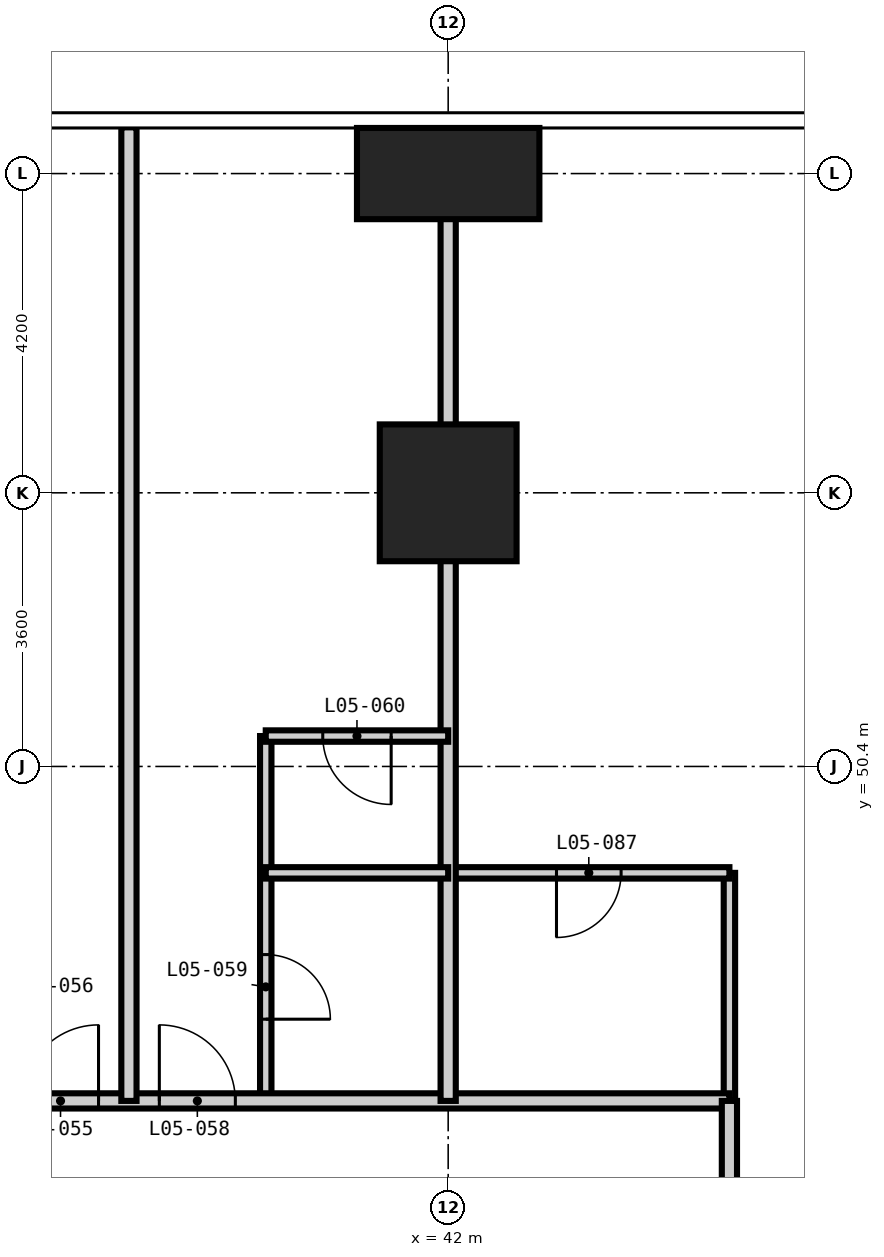
"""IFC4 building model, lengths in metres.
Left out: names, types, materials, properties, quantities, classifications, styles, units other than length and angle.
Written with IfcOpenShell. Run it as: python <this file> out.ifc"""

import sys

from ifc_helpers import new_model, si_unit, direction, frame, frame_2d, origin, origin_2d, place, context, subcontext, project, spatial, rectangle, extrude, element, fill, save


model = new_model("IFC4")
c1 = context("Model", 3, precision=1e-05, world=origin(), true_north=direction((0.0, 1.0)))
c2 = subcontext(c1, "Body", "Model", "MODEL_VIEW")
j1 = project(units=[si_unit("LENGTHUNIT", "METRE"), si_unit("PLANEANGLEUNIT", "RADIAN")], contexts=[c1])
p1 = place(None, origin())
s1 = spatial("IfcSite", under=j1, at=p1, CompositionType="ELEMENT")
p2 = place(p1, origin())
s2 = spatial("IfcBuilding", under=s1, at=p2, CompositionType="ELEMENT")
p3 = place(p2, frame((0.0, 0.0, 27.0)))
s3 = spatial("IfcBuildingStorey", under=s2, at=p3, CompositionType="ELEMENT", Elevation=27.0)
p4 = place(p3, frame((42.0, 54.0, -0.35), z_axis=(0.0, 0.0, 1.0), x_axis=(1.0, 0.0, 0.0)))
e1 = element("IfcColumn", 1, at=p4, inside=s3, PredefinedType="COLUMN", context=c2, shape_type="SweptSolid", body=[
    extrude(rectangle(XDim=1.8, YDim=1.8, at=origin_2d()), origin(), (0.0, 0.0, 1.0), 3.6),
])
p5 = place(p3, frame((42.0, 58.2, -0.35), z_axis=(0.0, 0.0, 1.0), x_axis=(1.0, 0.0, 0.0)))
e2 = element("IfcColumn", 2, at=p5, inside=s3, PredefinedType="COLUMN", context=c2, shape_type="SweptSolid", body=[
    extrude(rectangle(XDim=2.4, YDim=1.2, at=origin_2d()), origin(), (0.0, 0.0, 1.0), 3.6),
])
p6 = place(p3, frame((39.6, 46.0, 0.0), z_axis=(0.0, 0.0, 1.0), x_axis=(0.0, 1.0, 0.0)))
e3 = element("IfcWall", 3, at=p6, inside=s3, PredefinedType="PARTITIONING", context=c2, shape_type="SweptSolid", body=[
    extrude(rectangle(XDim=3.0, YDim=0.15, at=frame_2d((1.5, 0.0))), origin(), (0.0, 0.0, 1.0), 3.25),
])
p7 = place(p6, frame((1.075, 0.0, 0.0)))
e4 = element("IfcOpeningElement", 4, at=p7, cuts=e3, PredefinedType="OPENING", context=c2, shape_type="SweptSolid", body=[
    extrude(rectangle(XDim=0.85, YDim=2.1, at=frame_2d((0.425, 1.05))), frame((0.0, 0.085, 0.0), z_axis=(0.0, -1.0, 0.0), x_axis=(1.0, 0.0, 0.0)), (0.0, 0.0, 1.0), 0.17),
])
p8 = place(p3, frame((45.7, 46.0, 0.0), z_axis=(0.0, 0.0, 1.0), x_axis=(0.0, 1.0, 0.0)))
e5 = element("IfcWall", 5, at=p8, inside=s3, PredefinedType="PARTITIONING", context=c2, shape_type="SweptSolid", body=[
    extrude(rectangle(XDim=3.0, YDim=0.15, at=frame_2d((1.5, 0.0))), origin(), (0.0, 0.0, 1.0), 3.25),
])
p9 = place(p3, frame((42.0, 49.0, 0.0), z_axis=(0.0, 0.0, 1.0), x_axis=(1.0, 0.0, 0.0)))
e6 = element("IfcWall", 6, at=p9, inside=s3, PredefinedType="PARTITIONING", context=c2, shape_type="SweptSolid", body=[
    extrude(rectangle(XDim=3.7, YDim=0.15, at=frame_2d((1.85, 0.0))), origin(), (0.0, 0.0, 1.0), 3.25),
])
p10 = place(p9, frame((1.425, 0.0, 0.0)))
e7 = element("IfcOpeningElement", 7, at=p10, cuts=e6, PredefinedType="OPENING", context=c2, shape_type="SweptSolid", body=[
    extrude(rectangle(XDim=0.85, YDim=2.1, at=frame_2d((0.425, 1.05))), frame((0.0, 0.085, 0.0), z_axis=(0.0, -1.0, 0.0), x_axis=(1.0, 0.0, 0.0)), (0.0, 0.0, 1.0), 0.17),
])
p11 = place(p3, frame((13.4, 46.0, 0.0), z_axis=(0.0, 0.0, 1.0), x_axis=(1.0, 0.0, 0.0)))
e8 = element("IfcWall", 8, at=p11, inside=s3, PredefinedType="PARTITIONING", context=c2, shape_type="SweptSolid", body=[
    extrude(rectangle(XDim=32.3, YDim=0.2, at=frame_2d((16.15, 0.0))), origin(), (0.0, 0.0, 1.0), 3.25),
])
p12 = place(p11, frame((6.2, 0.0, 0.0)))
e9 = element("IfcOpeningElement", 9, at=p12, cuts=e8, PredefinedType="OPENING", context=c2, shape_type="SweptSolid", body=[
    extrude(rectangle(XDim=1.0, YDim=2.2, at=frame_2d((0.5, 1.1))), frame((0.0, 0.11, 0.0), z_axis=(0.0, -1.0, 0.0), x_axis=(1.0, 0.0, 0.0)), (0.0, 0.0, 1.0), 0.22),
])
p13 = place(p11, frame((8.0, 0.0, 0.0)))
e10 = element("IfcOpeningElement", 10, at=p13, cuts=e8, PredefinedType="OPENING", context=c2, shape_type="SweptSolid", body=[
    extrude(rectangle(XDim=1.0, YDim=2.2, at=frame_2d((0.5, 1.1))), frame((0.0, 0.11, 0.0), z_axis=(0.0, -1.0, 0.0), x_axis=(1.0, 0.0, 0.0)), (0.0, 0.0, 1.0), 0.22),
])
p14 = place(p11, frame((14.6, 0.0, 0.0)))
e11 = element("IfcOpeningElement", 11, at=p14, cuts=e8, PredefinedType="OPENING", context=c2, shape_type="SweptSolid", body=[
    extrude(rectangle(XDim=1.0, YDim=2.2, at=frame_2d((0.5, 1.1))), frame((0.0, 0.11, 0.0), z_axis=(0.0, -1.0, 0.0), x_axis=(1.0, 0.0, 0.0)), (0.0, 0.0, 1.0), 0.22),
])
p15 = place(p11, frame((16.4, 0.0, 0.0)))
e12 = element("IfcOpeningElement", 12, at=p15, cuts=e8, PredefinedType="OPENING", context=c2, shape_type="SweptSolid", body=[
    extrude(rectangle(XDim=1.0, YDim=2.2, at=frame_2d((0.5, 1.1))), frame((0.0, 0.11, 0.0), z_axis=(0.0, -1.0, 0.0), x_axis=(1.0, 0.0, 0.0)), (0.0, 0.0, 1.0), 0.22),
])
p16 = place(p11, frame((23.0, 0.0, 0.0)))
e13 = element("IfcOpeningElement", 13, at=p16, cuts=e8, PredefinedType="OPENING", context=c2, shape_type="SweptSolid", body=[
    extrude(rectangle(XDim=1.0, YDim=2.2, at=frame_2d((0.5, 1.1))), frame((0.0, 0.11, 0.0), z_axis=(0.0, -1.0, 0.0), x_axis=(1.0, 0.0, 0.0)), (0.0, 0.0, 1.0), 0.22),
])
p17 = place(p11, frame((24.8, 0.0, 0.0)))
e14 = element("IfcOpeningElement", 14, at=p17, cuts=e8, PredefinedType="OPENING", context=c2, shape_type="SweptSolid", body=[
    extrude(rectangle(XDim=1.0, YDim=2.2, at=frame_2d((0.5, 1.1))), frame((0.0, 0.11, 0.0), z_axis=(0.0, -1.0, 0.0), x_axis=(1.0, 0.0, 0.0)), (0.0, 0.0, 1.0), 0.22),
])
p18 = place(p3, frame((45.7, 46.0, 0.0), z_axis=(0.0, 0.0, 1.0), x_axis=(0.0, -1.0, 0.0)))
e15 = element("IfcWall", 15, at=p18, inside=s3, PredefinedType="PARTITIONING", context=c2, shape_type="SweptSolid", body=[
    extrude(rectangle(XDim=32.6, YDim=0.2, at=frame_2d((16.3, 0.0))), origin(), (0.0, 0.0, 1.0), 3.25),
])
p19 = place(p18, frame((26.6, 0.0, 0.0)))
e16 = element("IfcOpeningElement", 16, at=p19, cuts=e15, PredefinedType="OPENING", context=c2, shape_type="SweptSolid", body=[
    extrude(rectangle(XDim=1.0, YDim=2.2, at=frame_2d((0.5, 1.1))), frame((0.0, 0.11, 0.0), z_axis=(0.0, -1.0, 0.0), x_axis=(1.0, 0.0, 0.0)), (0.0, 0.0, 1.0), 0.22),
])
p20 = place(p18, frame((22.4, 0.0, 0.0)))
e17 = element("IfcOpeningElement", 17, at=p20, cuts=e15, PredefinedType="OPENING", context=c2, shape_type="SweptSolid", body=[
    extrude(rectangle(XDim=1.0, YDim=2.2, at=frame_2d((0.5, 1.1))), frame((0.0, 0.11, 0.0), z_axis=(0.0, -1.0, 0.0), x_axis=(1.0, 0.0, 0.0)), (0.0, 0.0, 1.0), 0.22),
])
p21 = place(p18, frame((17.0, 0.0, 0.0)))
e18 = element("IfcOpeningElement", 18, at=p21, cuts=e15, PredefinedType="OPENING", context=c2, shape_type="SweptSolid", body=[
    extrude(rectangle(XDim=1.0, YDim=2.2, at=frame_2d((0.5, 1.1))), frame((0.0, 0.11, 0.0), z_axis=(0.0, -1.0, 0.0), x_axis=(1.0, 0.0, 0.0)), (0.0, 0.0, 1.0), 0.22),
])
p22 = place(p18, frame((15.2, 0.0, 0.0)))
e19 = element("IfcOpeningElement", 19, at=p22, cuts=e15, PredefinedType="OPENING", context=c2, shape_type="SweptSolid", body=[
    extrude(rectangle(XDim=1.0, YDim=2.2, at=frame_2d((0.5, 1.1))), frame((0.0, 0.11, 0.0), z_axis=(0.0, -1.0, 0.0), x_axis=(1.0, 0.0, 0.0)), (0.0, 0.0, 1.0), 0.22),
])
p23 = place(p18, frame((8.6, 0.0, 0.0)))
e20 = element("IfcOpeningElement", 20, at=p23, cuts=e15, PredefinedType="OPENING", context=c2, shape_type="SweptSolid", body=[
    extrude(rectangle(XDim=1.0, YDim=2.2, at=frame_2d((0.5, 1.1))), frame((0.0, 0.11, 0.0), z_axis=(0.0, -1.0, 0.0), x_axis=(1.0, 0.0, 0.0)), (0.0, 0.0, 1.0), 0.22),
])
p24 = place(p18, frame((6.8, 0.0, 0.0)))
e21 = element("IfcOpeningElement", 21, at=p24, cuts=e15, PredefinedType="OPENING", context=c2, shape_type="SweptSolid", body=[
    extrude(rectangle(XDim=1.0, YDim=2.2, at=frame_2d((0.5, 1.1))), frame((0.0, 0.11, 0.0), z_axis=(0.0, -1.0, 0.0), x_axis=(1.0, 0.0, 0.0)), (0.0, 0.0, 1.0), 0.22),
])
p25 = place(p18, frame((30.4, 0.0, 0.0)))
e22 = element("IfcOpeningElement", 22, at=p25, cuts=e15, PredefinedType="OPENING", context=c2, shape_type="SweptSolid", body=[
    extrude(rectangle(XDim=1.0, YDim=2.2, at=frame_2d((0.5, 1.1))), frame((0.0, 0.11, 0.0), z_axis=(0.0, -1.0, 0.0), x_axis=(1.0, 0.0, 0.0)), (0.0, 0.0, 1.0), 0.22),
])
p26 = place(p18, frame((1.5, 0.0, 0.0)))
e23 = element("IfcOpeningElement", 23, at=p26, cuts=e15, PredefinedType="OPENING", context=c2, shape_type="SweptSolid", body=[
    extrude(rectangle(XDim=1.0, YDim=2.2, at=frame_2d((0.5, 1.1))), frame((0.0, 0.11, 0.0), z_axis=(0.0, -1.0, 0.0), x_axis=(1.0, 0.0, 0.0)), (0.0, 0.0, 1.0), 0.22),
])
for number, where, z_axis, x_axis in (
    (24, (37.8, 46.0, 0.0), (0.0, 0.0, 1.0), (0.0, 1.0, 0.0)),
    (25, (42.0, 46.0, 0.0), (0.0, 0.0, 1.0), (0.0, 1.0, 0.0)),
):
    element("IfcWall", number, at=place(p3, frame(where, z_axis=z_axis, x_axis=x_axis)), inside=s3, PredefinedType="PARTITIONING", context=c2, shape_type="SweptSolid", body=[
        extrude(rectangle(XDim=12.808, YDim=0.2, at=frame_2d((6.404, 0.0))), origin(), (0.0, 0.0, 1.0), 3.25),
    ])
p27 = place(p3, frame((39.6, 49.0, 0.0), z_axis=(0.0, 0.0, 1.0), x_axis=(0.0, 1.0, 0.0)))
e26 = element("IfcWall", 26, at=p27, inside=s3, PredefinedType="PARTITIONING", context=c2, shape_type="SweptSolid", body=[
    extrude(rectangle(XDim=1.8, YDim=0.15, at=frame_2d((0.9, 0.0))), origin(), (0.0, 0.0, 1.0), 3.25),
])
p28 = place(p3, frame((39.6, 49.0, 0.0), z_axis=(0.0, 0.0, 1.0), x_axis=(1.0, 0.0, 0.0)))
e27 = element("IfcWall", 27, at=p28, inside=s3, PredefinedType="PARTITIONING", context=c2, shape_type="SweptSolid", body=[
    extrude(rectangle(XDim=2.4, YDim=0.15, at=frame_2d((1.2, 0.0))), origin(), (0.0, 0.0, 1.0), 3.25),
])
p29 = place(p3, frame((39.6, 50.8, 0.0), z_axis=(0.0, 0.0, 1.0), x_axis=(1.0, 0.0, 0.0)))
e28 = element("IfcWall", 28, at=p29, inside=s3, PredefinedType="PARTITIONING", context=c2, shape_type="SweptSolid", body=[
    extrude(rectangle(XDim=2.4, YDim=0.15, at=frame_2d((1.2, 0.0))), origin(), (0.0, 0.0, 1.0), 3.25),
])
p30 = place(p29, frame((0.75, 0.0, 0.0)))
e29 = element("IfcOpeningElement", 29, at=p30, cuts=e28, PredefinedType="OPENING", context=c2, shape_type="SweptSolid", body=[
    extrude(rectangle(XDim=0.9, YDim=2.1, at=frame_2d((0.45, 1.05))), frame((0.0, 0.085, 0.0), z_axis=(0.0, -1.0, 0.0), x_axis=(1.0, 0.0, 0.0)), (0.0, 0.0, 1.0), 0.17),
])
p31 = place(p16, origin())
e30 = element("IfcDoor", 30, at=p31, inside=s3, OperationType="SINGLE_SWING_RIGHT", PredefinedType="DOOR", context=c2, shape_type="SweptSolid", body=[
    extrude(rectangle(XDim=1.0, YDim=2.2, at=frame_2d((0.5, 1.1))), frame((0.0, 0.025, 0.0), z_axis=(0.0, -1.0, 0.0), x_axis=(1.0, 0.0, 0.0)), (0.0, 0.0, 1.0), 0.05),
])
fill(e13, e30)
p32 = place(p17, origin())
e31 = element("IfcDoor", 31, at=p32, inside=s3, OperationType="SINGLE_SWING_LEFT", PredefinedType="DOOR", context=c2, shape_type="SweptSolid", body=[
    extrude(rectangle(XDim=1.0, YDim=2.2, at=frame_2d((0.5, 1.1))), frame((0.0, 0.025, 0.0), z_axis=(0.0, -1.0, 0.0), x_axis=(1.0, 0.0, 0.0)), (0.0, 0.0, 1.0), 0.05),
])
fill(e14, e31)
p33 = place(p7, frame((0.85, 0.0, 0.0), z_axis=(0.0, 0.0, 1.0), x_axis=(-1.0, 0.0, 0.0)))
e32 = element("IfcDoor", 32, at=p33, inside=s3, OperationType="SINGLE_SWING_RIGHT", PredefinedType="DOOR", context=c2, shape_type="SweptSolid", body=[
    extrude(rectangle(XDim=0.85, YDim=2.1, at=frame_2d((0.425, 1.05))), frame((0.0, 0.025, 0.0), z_axis=(0.0, -1.0, 0.0), x_axis=(1.0, 0.0, 0.0)), (0.0, 0.0, 1.0), 0.05),
])
fill(e4, e32)
p34 = place(p30, frame((0.9, 0.0, 0.0), z_axis=(0.0, 0.0, 1.0), x_axis=(-1.0, 0.0, 0.0)))
e33 = element("IfcDoor", 33, at=p34, inside=s3, OperationType="SINGLE_SWING_LEFT", PredefinedType="DOOR", context=c2, shape_type="SweptSolid", body=[
    extrude(rectangle(XDim=0.9, YDim=2.1, at=frame_2d((0.45, 1.05))), frame((0.0, 0.025, 0.0), z_axis=(0.0, -1.0, 0.0), x_axis=(1.0, 0.0, 0.0)), (0.0, 0.0, 1.0), 0.05),
])
fill(e29, e33)
p35 = place(p10, frame((0.85, 0.0, 0.0), z_axis=(0.0, 0.0, 1.0), x_axis=(-1.0, 0.0, 0.0)))
e34 = element("IfcDoor", 34, at=p35, inside=s3, OperationType="SINGLE_SWING_RIGHT", PredefinedType="DOOR", context=c2, shape_type="SweptSolid", body=[
    extrude(rectangle(XDim=0.85, YDim=2.1, at=frame_2d((0.425, 1.05))), frame((0.0, 0.025, 0.0), z_axis=(0.0, -1.0, 0.0), x_axis=(1.0, 0.0, 0.0)), (0.0, 0.0, 1.0), 0.05),
])
fill(e7, e34)
save(model, sys.argv[1])
